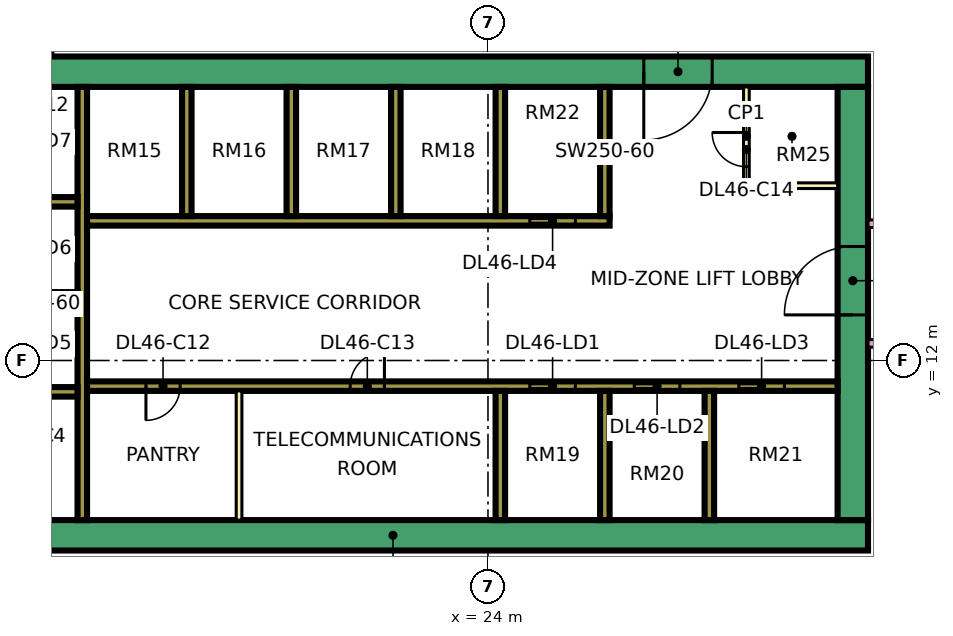
"""IFC4 building model, lengths in metres.
Left out: names, types, materials, properties, quantities, classifications, styles, units other than length and angle.
Written with IfcOpenShell. Run it as: python <this file> out.ifc"""

import sys

from ifc_helpers import new_model, si_unit, direction, frame, frame_2d, origin, place, context, subcontext, project, spatial, rectangle, extrude, element, fill, save


model = new_model("IFC4")
c1 = context("Model", 3, precision=1e-05, world=origin(), true_north=direction((0.0, 1.0)))
c2 = subcontext(c1, "Body", "Model", "MODEL_VIEW")
j1 = project(units=[si_unit("LENGTHUNIT", "METRE"), si_unit("PLANEANGLEUNIT", "RADIAN")], contexts=[c1])
p1 = place(None, origin())
s1 = spatial("IfcSite", under=j1, at=p1, CompositionType="ELEMENT")
p2 = place(p1, origin())
s2 = spatial("IfcBuilding", under=s1, at=p2, CompositionType="ELEMENT")
p3 = place(p2, frame((0.0, 0.0, 198.65)))
s3 = spatial("IfcBuildingStorey", under=s2, at=p3, CompositionType="ELEMENT", Elevation=198.65)
p4 = place(p3, frame((9.0, 7.4, 0.0), z_axis=(0.0, 0.0, 1.0), x_axis=(1.0, 0.0, 0.0)))
e1 = element("IfcWall", 1, at=p4, inside=s3, PredefinedType="SHEAR", context=c2, shape_type="SweptSolid", body=[
    extrude(rectangle(XDim=25.0, YDim=0.8, at=frame_2d((12.5, 0.0))), origin(), (0.0, 0.0, 1.0), 3.75),
])
p5 = place(p3, frame((9.0, 19.6, 0.0), z_axis=(0.0, 0.0, 1.0), x_axis=(1.0, 0.0, 0.0)))
e2 = element("IfcWall", 2, at=p5, inside=s3, PredefinedType="SHEAR", context=c2, shape_type="SweptSolid", body=[
    extrude(rectangle(XDim=25.0, YDim=0.8, at=frame_2d((12.5, 0.0))), origin(), (0.0, 0.0, 1.0), 3.75),
])
p6 = place(p5, frame((19.1, 0.0, 0.0)))
e3 = element("IfcOpeningElement", 3, at=p6, cuts=e2, PredefinedType="OPENING", context=c2, shape_type="SweptSolid", body=[
    extrude(rectangle(XDim=1.8, YDim=2.4, at=frame_2d((0.9, 1.2))), frame((0.0, 0.41, 0.0), z_axis=(0.0, -1.0, 0.0), x_axis=(1.0, 0.0, 0.0)), (0.0, 0.0, 1.0), 0.82),
])
p7 = place(p3, frame((33.6, 7.8, 0.0), z_axis=(0.0, 0.0, 1.0), x_axis=(0.0, 1.0, 0.0)))
e4 = element("IfcWall", 4, at=p7, inside=s3, PredefinedType="SHEAR", context=c2, shape_type="SweptSolid", body=[
    extrude(rectangle(XDim=11.4, YDim=0.8, at=frame_2d((5.7, 0.0))), origin(), (0.0, 0.0, 1.0), 3.75),
])
p8 = place(p7, frame((5.4, 0.0, 0.0)))
e5 = element("IfcOpeningElement", 5, at=p8, cuts=e4, PredefinedType="OPENING", context=c2, shape_type="SweptSolid", body=[
    extrude(rectangle(XDim=1.8, YDim=2.4, at=frame_2d((0.9, 1.2))), frame((0.0, 0.41, 0.0), z_axis=(0.0, -1.0, 0.0), x_axis=(1.0, 0.0, 0.0)), (0.0, 0.0, 1.0), 0.82),
])
p9 = place(p3, frame((13.325, 7.8, 0.0), z_axis=(0.0, 0.0, 1.0), x_axis=(0.0, 1.0, 0.0)))
e6 = element("IfcWall", 6, at=p9, inside=s3, PredefinedType="SHEAR", context=c2, shape_type="SweptSolid", body=[
    extrude(rectangle(XDim=11.4, YDim=0.25, at=frame_2d((5.7, 0.0))), origin(), (0.0, 0.0, 1.0), 3.75),
])
p10 = place(p3, frame((13.45, 11.325, 0.0), z_axis=(0.0, 0.0, 1.0), x_axis=(1.0, 0.0, 0.0)))
e7 = element("IfcWall", 7, at=p10, inside=s3, PredefinedType="SHEAR", context=c2, shape_type="SweptSolid", body=[
    extrude(rectangle(XDim=19.75, YDim=0.25, at=frame_2d((9.875, 0.0))), origin(), (0.0, 0.0, 1.0), 3.75),
])
p11 = place(p10, frame((11.65, 0.0, 0.0)))
e8 = element("IfcOpeningElement", 8, at=p11, cuts=e7, PredefinedType="OPENING", context=c2, shape_type="SweptSolid", body=[
    extrude(rectangle(XDim=1.2, YDim=2.2, at=frame_2d((0.6, 1.1))), frame((0.0, 0.135, 0.0), z_axis=(0.0, -1.0, 0.0), x_axis=(1.0, 0.0, 0.0)), (0.0, 0.0, 1.0), 0.27),
])
p12 = place(p10, frame((14.4, 0.0, 0.0)))
e9 = element("IfcOpeningElement", 9, at=p12, cuts=e7, PredefinedType="OPENING", context=c2, shape_type="SweptSolid", body=[
    extrude(rectangle(XDim=1.2, YDim=2.2, at=frame_2d((0.6, 1.1))), frame((0.0, 0.135, 0.0), z_axis=(0.0, -1.0, 0.0), x_axis=(1.0, 0.0, 0.0)), (0.0, 0.0, 1.0), 0.27),
])
p13 = place(p10, frame((17.15, 0.0, 0.0)))
e10 = element("IfcOpeningElement", 10, at=p13, cuts=e7, PredefinedType="OPENING", context=c2, shape_type="SweptSolid", body=[
    extrude(rectangle(XDim=1.2, YDim=2.2, at=frame_2d((0.6, 1.1))), frame((0.0, 0.135, 0.0), z_axis=(0.0, -1.0, 0.0), x_axis=(1.0, 0.0, 0.0)), (0.0, 0.0, 1.0), 0.27),
])
p14 = place(p10, frame((1.55, 0.0, 0.0)))
e11 = element("IfcOpeningElement", 11, at=p14, cuts=e7, PredefinedType="OPENING", context=c2, shape_type="SweptSolid", body=[
    extrude(rectangle(XDim=0.9, YDim=2.1, at=frame_2d((0.45, 1.05))), frame((0.0, 0.135, 0.0), z_axis=(0.0, -1.0, 0.0), x_axis=(1.0, 0.0, 0.0)), (0.0, 0.0, 1.0), 0.27),
])
p15 = place(p10, frame((6.925, 0.0, 0.0)))
e12 = element("IfcOpeningElement", 12, at=p15, cuts=e7, PredefinedType="OPENING", context=c2, shape_type="SweptSolid", body=[
    extrude(rectangle(XDim=0.9, YDim=2.1, at=frame_2d((0.45, 1.05))), frame((0.0, 0.135, 0.0), z_axis=(0.0, -1.0, 0.0), x_axis=(1.0, 0.0, 0.0)), (0.0, 0.0, 1.0), 0.27),
])
p16 = place(p3, frame((13.45, 15.675, 0.0), z_axis=(0.0, 0.0, 1.0), x_axis=(1.0, 0.0, 0.0)))
e13 = element("IfcWall", 13, at=p16, inside=s3, PredefinedType="SHEAR", context=c2, shape_type="SweptSolid", body=[
    extrude(rectangle(XDim=13.75, YDim=0.25, at=frame_2d((6.875, 0.0))), origin(), (0.0, 0.0, 1.0), 3.75),
])
p17 = place(p16, frame((11.65, 0.0, 0.0)))
e14 = element("IfcOpeningElement", 14, at=p17, cuts=e13, PredefinedType="OPENING", context=c2, shape_type="SweptSolid", body=[
    extrude(rectangle(XDim=1.2, YDim=2.2, at=frame_2d((0.6, 1.1))), frame((0.0, 0.135, 0.0), z_axis=(0.0, -1.0, 0.0), x_axis=(1.0, 0.0, 0.0)), (0.0, 0.0, 1.0), 0.27),
])
for number, where, z_axis, x_axis in (
    (15, (10.2, 11.175, 0.0), (0.0, 0.0, 1.0), (1.0, 0.0, 0.0)),
    (16, (10.2, 13.675, 0.0), (0.0, 0.0, 1.0), (1.0, 0.0, 0.0)),
    (17, (10.2, 16.175, 0.0), (0.0, 0.0, 1.0), (1.0, 0.0, 0.0)),
):
    element("IfcWall", number, at=place(p3, frame(where, z_axis=z_axis, x_axis=x_axis)), inside=s3, PredefinedType="SHEAR", context=c2, shape_type="SweptSolid", body=[
        extrude(rectangle(XDim=3.0, YDim=0.25, at=frame_2d((1.5, 0.0))), origin(), (0.0, 0.0, 1.0), 3.75),
    ])
for number, where, z_axis, x_axis in (
    (18, (24.325, 7.8, 0.0), (0.0, 0.0, 1.0), (0.0, 1.0, 0.0)),
    (19, (27.075, 7.8, 0.0), (0.0, 0.0, 1.0), (0.0, 1.0, 0.0)),
    (20, (29.825, 7.8, 0.0), (0.0, 0.0, 1.0), (0.0, 1.0, 0.0)),
    (21, (16.075, 15.8, 0.0), (0.0, 0.0, 1.0), (0.0, 1.0, 0.0)),
    (22, (18.825, 15.8, 0.0), (0.0, 0.0, 1.0), (0.0, 1.0, 0.0)),
    (23, (21.575, 15.8, 0.0), (0.0, 0.0, 1.0), (0.0, 1.0, 0.0)),
    (24, (24.325, 15.8, 0.0), (0.0, 0.0, 1.0), (0.0, 1.0, 0.0)),
    (25, (27.075, 15.8, 0.0), (0.0, 0.0, 1.0), (0.0, 1.0, 0.0)),
):
    element("IfcWall", number, at=place(p3, frame(where, z_axis=z_axis, x_axis=x_axis)), inside=s3, PredefinedType="SHEAR", context=c2, shape_type="SweptSolid", body=[
        extrude(rectangle(XDim=3.4, YDim=0.25, at=frame_2d((1.7, 0.0))), origin(), (0.0, 0.0, 1.0), 3.75),
    ])
p18 = place(p3, frame((-1.447, 12.553, 0.0), z_axis=(0.0, 0.0, 1.0), x_axis=(0.707106781187, -0.707106781187, 0.0)))
e26 = element("IfcWall", 26, at=p18, inside=s3, PredefinedType="SOLIDWALL", context=c2, shape_type="SweptSolid", body=[
    extrude(rectangle(XDim=19.799, YDim=0.15, at=frame_2d((9.899, 0.0))), origin(), (0.0, 0.0, 1.0), 3.35),
])
p19 = place(p18, frame((2.212, 0.0, 0.45)))
e27 = element("IfcOpeningElement", 27, at=p19, cuts=e26, PredefinedType="OPENING", context=c2, shape_type="SweptSolid", body=[
    extrude(rectangle(XDim=3.0, YDim=2.4, at=frame_2d((1.5, 1.2))), frame((0.0, 0.085, 0.0), z_axis=(0.0, -1.0, 0.0), x_axis=(1.0, 0.0, 0.0)), (0.0, 0.0, 1.0), 0.17),
])
p20 = place(p18, frame((10.216, 0.0, 0.45)))
e28 = element("IfcOpeningElement", 28, at=p20, cuts=e26, PredefinedType="OPENING", context=c2, shape_type="SweptSolid", body=[
    extrude(rectangle(XDim=3.0, YDim=2.4, at=frame_2d((1.5, 1.2))), frame((0.0, 0.085, 0.0), z_axis=(0.0, -1.0, 0.0), x_axis=(1.0, 0.0, 0.0)), (0.0, 0.0, 1.0), 0.17),
])
p21 = place(p3, frame((17.45, 7.8, 0.0), z_axis=(0.0, 0.0, 1.0), x_axis=(0.0, 1.0, 0.0)))
e29 = element("IfcWall", 29, at=p21, inside=s3, PredefinedType="PARTITIONING", context=c2, shape_type="SweptSolid", body=[
    extrude(rectangle(XDim=3.4, YDim=0.15, at=frame_2d((1.7, 0.0))), origin(), (0.0, 0.0, 1.0), 3.35),
])
p22 = place(p3, frame((30.8, 16.6, 0.0), z_axis=(0.0, 0.0, 1.0), x_axis=(0.0, 1.0, 0.0)))
e30 = element("IfcWall", 30, at=p22, inside=s3, PredefinedType="PARTITIONING", context=c2, shape_type="SweptSolid", body=[
    extrude(rectangle(XDim=2.6, YDim=0.15, at=frame_2d((1.3, 0.0))), origin(), (0.0, 0.0, 1.0), 3.35),
])
p23 = place(p22, frame((0.5, 0.0, 0.0)))
e31 = element("IfcOpeningElement", 31, at=p23, cuts=e30, PredefinedType="OPENING", context=c2, shape_type="SweptSolid", body=[
    extrude(rectangle(XDim=0.9, YDim=2.1, at=frame_2d((0.45, 1.05))), frame((0.0, 0.085, 0.0), z_axis=(0.0, -1.0, 0.0), x_axis=(1.0, 0.0, 0.0)), (0.0, 0.0, 1.0), 0.17),
])
p24 = place(p3, frame((30.8, 16.6, 0.0), z_axis=(0.0, 0.0, 1.0), x_axis=(1.0, 0.0, 0.0)))
e32 = element("IfcWall", 32, at=p24, inside=s3, PredefinedType="PARTITIONING", context=c2, shape_type="SweptSolid", body=[
    extrude(rectangle(XDim=2.4, YDim=0.15, at=frame_2d((1.2, 0.0))), origin(), (0.0, 0.0, 1.0), 3.35),
])
p25 = place(p3, frame((12.45, 20.0, 0.0), z_axis=(0.0, 0.0, 1.0), x_axis=(0.0, 1.0, 0.0)))
e33 = element("IfcWall", 33, at=p25, inside=s3, PredefinedType="PARTITIONING", context=c2, shape_type="SweptSolid", body=[
    extrude(rectangle(XDim=42.926, YDim=0.2, at=frame_2d((21.463, 0.0))), origin(), (0.0, 0.0, 1.0), 3.35),
])
p26 = place(p25, frame((7.15, 0.0, 0.0)))
e34 = element("IfcOpeningElement", 34, at=p26, cuts=e33, PredefinedType="OPENING", context=c2, shape_type="SweptSolid", body=[
    extrude(rectangle(XDim=1.6, YDim=2.1, at=frame_2d((0.8, 1.05))), frame((0.0, 0.11, 0.0), z_axis=(0.0, -1.0, 0.0), x_axis=(1.0, 0.0, 0.0)), (0.0, 0.0, 1.0), 0.22),
])
p27 = place(p25, frame((13.5, 0.0, 0.0)))
e35 = element("IfcOpeningElement", 35, at=p27, cuts=e33, PredefinedType="OPENING", context=c2, shape_type="SweptSolid", body=[
    extrude(rectangle(XDim=1.0, YDim=2.1, at=frame_2d((0.5, 1.05))), frame((0.0, 0.11, 0.0), z_axis=(0.0, -1.0, 0.0), x_axis=(1.0, 0.0, 0.0)), (0.0, 0.0, 1.0), 0.22),
])
p28 = place(p25, frame((17.2, 0.0, 0.0)))
e36 = element("IfcOpeningElement", 36, at=p28, cuts=e33, PredefinedType="OPENING", context=c2, shape_type="SweptSolid", body=[
    extrude(rectangle(XDim=1.0, YDim=2.1, at=frame_2d((0.5, 1.05))), frame((0.0, 0.11, 0.0), z_axis=(0.0, -1.0, 0.0), x_axis=(1.0, 0.0, 0.0)), (0.0, 0.0, 1.0), 0.22),
])
p29 = place(p25, frame((35.2, 0.0, 0.0)))
e37 = element("IfcOpeningElement", 37, at=p29, cuts=e33, PredefinedType="OPENING", context=c2, shape_type="SweptSolid", body=[
    extrude(rectangle(XDim=1.0, YDim=2.1, at=frame_2d((0.5, 1.05))), frame((0.0, 0.11, 0.0), z_axis=(0.0, -1.0, 0.0), x_axis=(1.0, 0.0, 0.0)), (0.0, 0.0, 1.0), 0.22),
])
p30 = place(p25, frame((1.15, 0.0, 0.0)))
e38 = element("IfcOpeningElement", 38, at=p30, cuts=e33, PredefinedType="OPENING", context=c2, shape_type="SweptSolid", body=[
    extrude(rectangle(XDim=1.8, YDim=2.1, at=frame_2d((0.9, 1.05))), frame((0.0, 0.11, 0.0), z_axis=(0.0, -1.0, 0.0), x_axis=(1.0, 0.0, 0.0)), (0.0, 0.0, 1.0), 0.22),
])
p31 = place(p25, frame((28.6, 0.0, 0.0)))
e39 = element("IfcOpeningElement", 39, at=p31, cuts=e33, PredefinedType="OPENING", context=c2, shape_type="SweptSolid", body=[
    extrude(rectangle(XDim=1.8, YDim=2.1, at=frame_2d((0.9, 1.05))), frame((0.0, 0.11, 0.0), z_axis=(0.0, -1.0, 0.0), x_axis=(1.0, 0.0, 0.0)), (0.0, 0.0, 1.0), 0.22),
])
p32 = place(p3, frame((34.0, 12.45, 0.0), z_axis=(0.0, 0.0, 1.0), x_axis=(1.0, 0.0, 0.0)))
e40 = element("IfcWall", 40, at=p32, inside=s3, PredefinedType="PARTITIONING", context=c2, shape_type="SweptSolid", body=[
    extrude(rectangle(XDim=2.451, YDim=0.2, at=frame_2d((1.226, 0.0))), origin(), (0.0, 0.0, 1.0), 3.35),
])
p33 = place(p3, frame((34.0, 15.6, 0.0), z_axis=(0.0, 0.0, 1.0), x_axis=(1.0, 0.0, 0.0)))
e41 = element("IfcWall", 41, at=p33, inside=s3, PredefinedType="PARTITIONING", context=c2, shape_type="SweptSolid", body=[
    extrude(rectangle(XDim=10.35, YDim=0.2, at=frame_2d((5.175, 0.0))), origin(), (0.0, 0.0, 1.0), 3.35),
])
p34 = place(p33, frame((5.6, 0.0, 0.0)))
e42 = element("IfcOpeningElement", 42, at=p34, cuts=e41, PredefinedType="OPENING", context=c2, shape_type="SweptSolid", body=[
    extrude(rectangle(XDim=1.0, YDim=2.1, at=frame_2d((0.5, 1.05))), frame((0.0, 0.11, 0.0), z_axis=(0.0, -1.0, 0.0), x_axis=(1.0, 0.0, 0.0)), (0.0, 0.0, 1.0), 0.22),
])
p35 = place(p33, frame((0.45, 0.0, 0.0)))
e43 = element("IfcOpeningElement", 43, at=p35, cuts=e41, PredefinedType="OPENING", context=c2, shape_type="SweptSolid", body=[
    extrude(rectangle(XDim=1.2, YDim=2.1, at=frame_2d((0.6, 1.05))), frame((0.0, 0.11, 0.0), z_axis=(0.0, -1.0, 0.0), x_axis=(1.0, 0.0, 0.0)), (0.0, 0.0, 1.0), 0.22),
])
p36 = place(p11, origin())
e44 = element("IfcDoor", 44, at=p36, inside=s3, OperationType="DOUBLE_DOOR_SLIDING", PredefinedType="DOOR", context=c2, shape_type="SweptSolid", body=[
    extrude(rectangle(XDim=1.2, YDim=2.2, at=frame_2d((0.6, 1.1))), frame((0.0, 0.025, 0.0), z_axis=(0.0, -1.0, 0.0), x_axis=(1.0, 0.0, 0.0)), (0.0, 0.0, 1.0), 0.05),
])
fill(e8, e44)
p37 = place(p12, origin())
e45 = element("IfcDoor", 45, at=p37, inside=s3, OperationType="DOUBLE_DOOR_SLIDING", PredefinedType="DOOR", context=c2, shape_type="SweptSolid", body=[
    extrude(rectangle(XDim=1.2, YDim=2.2, at=frame_2d((0.6, 1.1))), frame((0.0, 0.025, 0.0), z_axis=(0.0, -1.0, 0.0), x_axis=(1.0, 0.0, 0.0)), (0.0, 0.0, 1.0), 0.05),
])
fill(e9, e45)
p38 = place(p13, origin())
e46 = element("IfcDoor", 46, at=p38, inside=s3, OperationType="DOUBLE_DOOR_SLIDING", PredefinedType="DOOR", context=c2, shape_type="SweptSolid", body=[
    extrude(rectangle(XDim=1.2, YDim=2.2, at=frame_2d((0.6, 1.1))), frame((0.0, 0.025, 0.0), z_axis=(0.0, -1.0, 0.0), x_axis=(1.0, 0.0, 0.0)), (0.0, 0.0, 1.0), 0.05),
])
fill(e10, e46)
p39 = place(p17, origin())
e47 = element("IfcDoor", 47, at=p39, inside=s3, OperationType="DOUBLE_DOOR_SLIDING", PredefinedType="DOOR", context=c2, shape_type="SweptSolid", body=[
    extrude(rectangle(XDim=1.2, YDim=2.2, at=frame_2d((0.6, 1.1))), frame((0.0, 0.025, 0.0), z_axis=(0.0, -1.0, 0.0), x_axis=(1.0, 0.0, 0.0)), (0.0, 0.0, 1.0), 0.05),
])
fill(e14, e47)
p40 = place(p8, origin())
e48 = element("IfcDoor", 48, at=p40, inside=s3, OperationType="DOUBLE_DOOR_SINGLE_SWING", PredefinedType="DOOR", context=c2, shape_type="SweptSolid", body=[
    extrude(rectangle(XDim=1.8, YDim=2.4, at=frame_2d((0.9, 1.2))), frame((0.0, 0.025, 0.0), z_axis=(0.0, -1.0, 0.0), x_axis=(1.0, 0.0, 0.0)), (0.0, 0.0, 1.0), 0.05),
])
fill(e5, e48)
p41 = place(p6, frame((1.8, 0.0, 0.0), z_axis=(0.0, 0.0, 1.0), x_axis=(-1.0, 0.0, 0.0)))
e49 = element("IfcDoor", 49, at=p41, inside=s3, OperationType="DOUBLE_DOOR_SINGLE_SWING", PredefinedType="DOOR", context=c2, shape_type="SweptSolid", body=[
    extrude(rectangle(XDim=1.8, YDim=2.4, at=frame_2d((0.9, 1.2))), frame((0.0, 0.025, 0.0), z_axis=(0.0, -1.0, 0.0), x_axis=(1.0, 0.0, 0.0)), (0.0, 0.0, 1.0), 0.05),
])
fill(e3, e49)
p42 = place(p14, frame((0.9, 0.0, 0.0), z_axis=(0.0, 0.0, 1.0), x_axis=(-1.0, 0.0, 0.0)))
e50 = element("IfcDoor", 50, at=p42, inside=s3, OperationType="SINGLE_SWING_LEFT", PredefinedType="DOOR", context=c2, shape_type="SweptSolid", body=[
    extrude(rectangle(XDim=0.9, YDim=2.1, at=frame_2d((0.45, 1.05))), frame((0.0, 0.025, 0.0), z_axis=(0.0, -1.0, 0.0), x_axis=(1.0, 0.0, 0.0)), (0.0, 0.0, 1.0), 0.05),
])
fill(e11, e50)
p43 = place(p15, frame((0.9, 0.0, 0.0), z_axis=(0.0, 0.0, 1.0), x_axis=(-1.0, 0.0, 0.0)))
e51 = element("IfcDoor", 51, at=p43, inside=s3, OperationType="SINGLE_SWING_RIGHT", PredefinedType="DOOR", context=c2, shape_type="SweptSolid", body=[
    extrude(rectangle(XDim=0.9, YDim=2.1, at=frame_2d((0.45, 1.05))), frame((0.0, 0.025, 0.0), z_axis=(0.0, -1.0, 0.0), x_axis=(1.0, 0.0, 0.0)), (0.0, 0.0, 1.0), 0.05),
])
fill(e12, e51)
p44 = place(p23, frame((0.9, 0.0, 0.0), z_axis=(0.0, 0.0, 1.0), x_axis=(-1.0, 0.0, 0.0)))
e52 = element("IfcDoor", 52, at=p44, inside=s3, OperationType="SINGLE_SWING_RIGHT", PredefinedType="DOOR", context=c2, shape_type="SweptSolid", body=[
    extrude(rectangle(XDim=0.9, YDim=2.1, at=frame_2d((0.45, 1.05))), frame((0.0, 0.025, 0.0), z_axis=(0.0, -1.0, 0.0), x_axis=(1.0, 0.0, 0.0)), (0.0, 0.0, 1.0), 0.05),
])
fill(e31, e52)
save(model, sys.argv[1])
